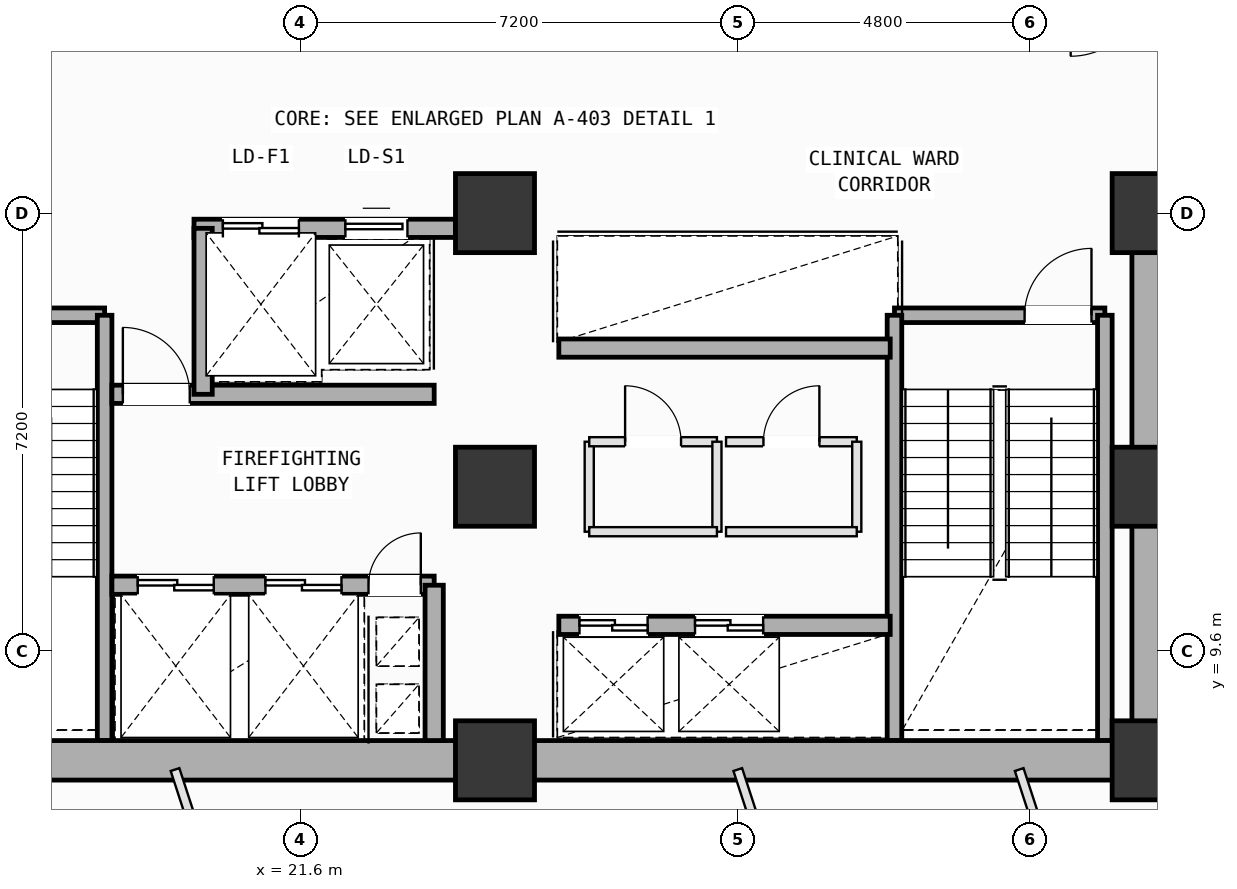
"""IFC4 building model, lengths in metres.
Left out: names, types, materials, properties, quantities, classifications, styles, units other than length and angle.
Written with IfcOpenShell. Run it as: python <this file> out.ifc"""

import sys

from ifc_helpers import new_model, si_unit, direction, frame, frame_2d, origin, origin_2d, place, context, subcontext, project, spatial, rectangle, extrude, element, fill, save


model = new_model("IFC4")
c1 = context("Model", 3, precision=1e-05, world=origin(), true_north=direction((0.0, 1.0)))
c2 = subcontext(c1, "Body", "Model", "MODEL_VIEW")
j1 = project(units=[si_unit("LENGTHUNIT", "METRE"), si_unit("PLANEANGLEUNIT", "RADIAN")], contexts=[c1])
p1 = place(None, origin())
s1 = spatial("IfcSite", under=j1, at=p1, CompositionType="ELEMENT")
p2 = place(p1, origin())
s2 = spatial("IfcBuilding", under=s1, at=p2, CompositionType="ELEMENT")
p3 = place(p2, frame((0.0, 0.0, 100.4)))
s3 = spatial("IfcBuildingStorey", under=s2, at=p3, CompositionType="ELEMENT", Elevation=100.4)
for number, where, z_axis, x_axis in (
    (1, (24.8, 7.8, 0.0), (0.0, 0.0, 1.0), (1.0, 0.0, 0.0)),
    (2, (24.8, 12.3, 0.0), (0.0, 0.0, 1.0), (1.0, 0.0, 0.0)),
    (3, (24.8, 16.8, 0.0), (0.0, 0.0, 1.0), (1.0, 0.0, 0.0)),
    (4, (35.6, 7.8, 0.0), (0.0, 0.0, 1.0), (1.0, 0.0, 0.0)),
    (5, (35.6, 12.3, 0.0), (0.0, 0.0, 1.0), (1.0, 0.0, 0.0)),
    (6, (35.6, 16.8, 0.0), (0.0, 0.0, 1.0), (1.0, 0.0, 0.0)),
):
    element("IfcColumn", number, at=place(p3, frame(where, z_axis=z_axis, x_axis=x_axis)), inside=s3, PredefinedType="COLUMN", context=c2, shape_type="SweptSolid", body=[
        extrude(rectangle(XDim=1.3, YDim=1.3, at=origin_2d()), origin(), (0.0, 0.0, 1.0), 4.0),
    ])
p4 = place(p3, frame((14.92, 15.12, 0.0), z_axis=(0.0, 0.0, 1.0), x_axis=(1.0, 0.0, 0.0)))
e7 = element("IfcWall", 7, at=p4, inside=s3, PredefinedType="SOLIDWALL", context=c2, shape_type="SweptSolid", body=[
    extrude(rectangle(XDim=3.46, YDim=0.24, at=frame_2d((1.73, 0.0))), origin(), (0.0, 0.0, 1.0), 3.78),
])
p5 = place(p4, frame((0.22, 0.0, 0.0)))
e8 = element("IfcOpeningElement", 8, at=p5, cuts=e7, PredefinedType="OPENING", context=c2, shape_type="SweptSolid", body=[
    extrude(rectangle(XDim=1.1, YDim=2.15, at=frame_2d((0.55, 1.075))), frame((0.0, 0.13, 0.0), z_axis=(0.0, -1.0, 0.0), x_axis=(1.0, 0.0, 0.0)), (0.0, 0.0, 1.0), 0.26),
])
p6 = place(p3, frame((18.38, 15.12, 0.0), z_axis=(0.0, 0.0, 1.0), x_axis=(0.0, -1.0, 0.0)))
e9 = element("IfcWall", 9, at=p6, inside=s3, PredefinedType="SOLIDWALL", context=c2, shape_type="SweptSolid", body=[
    extrude(rectangle(XDim=6.995, YDim=0.24, at=frame_2d((3.498, 0.0))), origin(), (0.0, 0.0, 1.0), 3.78),
])
p7 = place(p3, frame((31.37, 15.12, 0.0), z_axis=(0.0, 0.0, 1.0), x_axis=(1.0, 0.0, 0.0)))
e10 = element("IfcWall", 10, at=p7, inside=s3, PredefinedType="SOLIDWALL", context=c2, shape_type="SweptSolid", body=[
    extrude(rectangle(XDim=3.46, YDim=0.24, at=frame_2d((1.73, 0.0))), origin(), (0.0, 0.0, 1.0), 3.78),
])
p8 = place(p7, frame((2.14, 0.0, 0.0)))
e11 = element("IfcOpeningElement", 11, at=p8, cuts=e10, PredefinedType="OPENING", context=c2, shape_type="SweptSolid", body=[
    extrude(rectangle(XDim=1.1, YDim=2.15, at=frame_2d((0.55, 1.075))), frame((0.0, 0.13, 0.0), z_axis=(0.0, -1.0, 0.0), x_axis=(1.0, 0.0, 0.0)), (0.0, 0.0, 1.0), 0.26),
])
for number, where, z_axis, x_axis in (
    (12, (34.83, 15.12, 0.0), (0.0, 0.0, 1.0), (0.0, -1.0, 0.0)),
    (13, (31.37, 8.125, 0.0), (0.0, 0.0, 1.0), (0.0, 1.0, 0.0)),
):
    element("IfcWall", number, at=place(p3, frame(where, z_axis=z_axis, x_axis=x_axis)), inside=s3, PredefinedType="SOLIDWALL", context=c2, shape_type="SweptSolid", body=[
        extrude(rectangle(XDim=6.995, YDim=0.24, at=frame_2d((3.498, 0.0))), origin(), (0.0, 0.0, 1.0), 3.78),
    ])
for number, where, z_axis, x_axis in (
    (14, (14.0, 7.8, 0.0), (0.0, 0.0, 1.0), (1.0, 0.0, 0.0)),
    (15, (24.8, 7.8, 0.0), (0.0, 0.0, 1.0), (1.0, 0.0, 0.0)),
):
    element("IfcWall", number, at=place(p3, frame(where, z_axis=z_axis, x_axis=x_axis)), inside=s3, PredefinedType="SHEAR", context=c2, shape_type="SweptSolid", body=[
        extrude(rectangle(XDim=10.8, YDim=0.65, at=frame_2d((5.4, 0.0))), origin(), (0.0, 0.0, 1.0), 3.78),
    ])
p9 = place(p3, frame((35.6, 7.8, 0.0), z_axis=(0.0, 0.0, 1.0), x_axis=(0.0, 1.0, 0.0)))
e16 = element("IfcWall", 16, at=p9, inside=s3, PredefinedType="SHEAR", context=c2, shape_type="SweptSolid", body=[
    extrude(rectangle(XDim=9.0, YDim=0.65, at=frame_2d((4.5, 0.0))), origin(), (0.0, 0.0, 1.0), 3.78),
])
p10 = place(p3, frame((19.85, 16.55, 0.0), z_axis=(0.0, 0.0, 1.0), x_axis=(1.0, 0.0, 0.0)))
e17 = element("IfcWall", 17, at=p10, inside=s3, PredefinedType="SOLIDWALL", context=c2, shape_type="SweptSolid", body=[
    extrude(rectangle(XDim=4.3, YDim=0.3, at=frame_2d((2.15, 0.0))), origin(), (0.0, 0.0, 1.0), 3.78),
])
p11 = place(p10, frame((0.475, 0.0, 0.0)))
e18 = element("IfcOpeningElement", 18, at=p11, cuts=e17, PredefinedType="OPENING", context=c2, shape_type="SweptSolid", body=[
    extrude(rectangle(XDim=1.25, YDim=2.18, at=frame_2d((0.625, 1.09))), frame((0.0, 0.16, 0.0), z_axis=(0.0, -1.0, 0.0), x_axis=(1.0, 0.0, 0.0)), (0.0, 0.0, 1.0), 0.32),
])
p12 = place(p10, frame((2.49, 0.0, 0.0)))
e19 = element("IfcOpeningElement", 19, at=p12, cuts=e17, PredefinedType="OPENING", context=c2, shape_type="SweptSolid", body=[
    extrude(rectangle(XDim=1.02, YDim=2.12, at=frame_2d((0.51, 1.06))), frame((0.0, 0.16, 0.0), z_axis=(0.0, -1.0, 0.0), x_axis=(1.0, 0.0, 0.0)), (0.0, 0.0, 1.0), 0.32),
])
p13 = place(p3, frame((18.5, 10.68, 0.0), z_axis=(0.0, 0.0, 1.0), x_axis=(1.0, 0.0, 0.0)))
e20 = element("IfcWall", 20, at=p13, inside=s3, PredefinedType="SOLIDWALL", context=c2, shape_type="SweptSolid", body=[
    extrude(rectangle(XDim=5.3, YDim=0.3, at=frame_2d((2.65, 0.0))), origin(), (0.0, 0.0, 1.0), 3.78),
])
p14 = place(p13, frame((4.22, 0.0, 0.0)))
e21 = element("IfcOpeningElement", 21, at=p14, cuts=e20, PredefinedType="OPENING", context=c2, shape_type="SweptSolid", body=[
    extrude(rectangle(XDim=0.86, YDim=2.06, at=frame_2d((0.43, 1.03))), frame((0.0, 0.16, 0.0), z_axis=(0.0, -1.0, 0.0), x_axis=(1.0, 0.0, 0.0)), (0.0, 0.0, 1.0), 0.32),
])
p15 = place(p13, frame((0.425, 0.0, 0.0)))
e22 = element("IfcOpeningElement", 22, at=p15, cuts=e20, PredefinedType="OPENING", context=c2, shape_type="SweptSolid", body=[
    extrude(rectangle(XDim=1.25, YDim=2.18, at=frame_2d((0.625, 1.09))), frame((0.0, 0.16, 0.0), z_axis=(0.0, -1.0, 0.0), x_axis=(1.0, 0.0, 0.0)), (0.0, 0.0, 1.0), 0.32),
])
p16 = place(p13, frame((2.525, 0.0, 0.0)))
e23 = element("IfcOpeningElement", 23, at=p16, cuts=e20, PredefinedType="OPENING", context=c2, shape_type="SweptSolid", body=[
    extrude(rectangle(XDim=1.25, YDim=2.18, at=frame_2d((0.625, 1.09))), frame((0.0, 0.16, 0.0), z_axis=(0.0, -1.0, 0.0), x_axis=(1.0, 0.0, 0.0)), (0.0, 0.0, 1.0), 0.32),
])
p17 = place(p3, frame((18.5, 13.82, 0.0), z_axis=(0.0, 0.0, 1.0), x_axis=(1.0, 0.0, 0.0)))
e24 = element("IfcWall", 24, at=p17, inside=s3, PredefinedType="SOLIDWALL", context=c2, shape_type="SweptSolid", body=[
    extrude(rectangle(XDim=5.3, YDim=0.3, at=frame_2d((2.65, 0.0))), origin(), (0.0, 0.0, 1.0), 3.78),
])
p18 = place(p17, frame((0.18, 0.0, 0.0)))
e25 = element("IfcOpeningElement", 25, at=p18, cuts=e24, PredefinedType="OPENING", context=c2, shape_type="SweptSolid", body=[
    extrude(rectangle(XDim=1.1, YDim=2.15, at=frame_2d((0.55, 1.075))), frame((0.0, 0.16, 0.0), z_axis=(0.0, -1.0, 0.0), x_axis=(1.0, 0.0, 0.0)), (0.0, 0.0, 1.0), 0.32),
])
p19 = place(p3, frame((23.8, 8.125, 0.0), z_axis=(0.0, 0.0, 1.0), x_axis=(0.0, 1.0, 0.0)))
e26 = element("IfcWall", 26, at=p19, inside=s3, PredefinedType="SOLIDWALL", context=c2, shape_type="SweptSolid", body=[
    extrude(rectangle(XDim=2.555, YDim=0.3, at=frame_2d((1.277, 0.0))), origin(), (0.0, 0.0, 1.0), 3.78),
])
p20 = place(p3, frame((20.0, 13.82, 0.0), z_axis=(0.0, 0.0, 1.0), x_axis=(0.0, 1.0, 0.0)))
e27 = element("IfcWall", 27, at=p20, inside=s3, PredefinedType="SOLIDWALL", context=c2, shape_type="SweptSolid", body=[
    extrude(rectangle(XDim=2.73, YDim=0.3, at=frame_2d((1.365, 0.0))), origin(), (0.0, 0.0, 1.0), 3.78),
])
p21 = place(p3, frame((25.85, 10.02, 0.0), z_axis=(0.0, 0.0, 1.0), x_axis=(1.0, 0.0, 0.0)))
e28 = element("IfcWall", 28, at=p21, inside=s3, PredefinedType="SOLIDWALL", context=c2, shape_type="SweptSolid", body=[
    extrude(rectangle(XDim=5.45, YDim=0.3, at=frame_2d((2.725, 0.0))), origin(), (0.0, 0.0, 1.0), 3.78),
])
p22 = place(p21, frame((0.34, 0.0, 0.0)))
e29 = element("IfcOpeningElement", 29, at=p22, cuts=e28, PredefinedType="OPENING", context=c2, shape_type="SweptSolid", body=[
    extrude(rectangle(XDim=1.12, YDim=2.15, at=frame_2d((0.56, 1.075))), frame((0.0, 0.16, 0.0), z_axis=(0.0, -1.0, 0.0), x_axis=(1.0, 0.0, 0.0)), (0.0, 0.0, 1.0), 0.32),
])
p23 = place(p21, frame((2.24, 0.0, 0.0)))
e30 = element("IfcOpeningElement", 30, at=p23, cuts=e28, PredefinedType="OPENING", context=c2, shape_type="SweptSolid", body=[
    extrude(rectangle(XDim=1.12, YDim=2.15, at=frame_2d((0.56, 1.075))), frame((0.0, 0.16, 0.0), z_axis=(0.0, -1.0, 0.0), x_axis=(1.0, 0.0, 0.0)), (0.0, 0.0, 1.0), 0.32),
])
p24 = place(p3, frame((25.85, 14.58, 0.0), z_axis=(0.0, 0.0, 1.0), x_axis=(1.0, 0.0, 0.0)))
e31 = element("IfcWall", 31, at=p24, inside=s3, PredefinedType="SOLIDWALL", context=c2, shape_type="SweptSolid", body=[
    extrude(rectangle(XDim=5.45, YDim=0.3, at=frame_2d((2.725, 0.0))), origin(), (0.0, 0.0, 1.0), 3.78),
])
p25 = place(p3, frame((26.35, 11.56, 0.0), z_axis=(0.0, 0.0, 1.0), x_axis=(0.0, 1.0, 0.0)))
e32 = element("IfcWall", 32, at=p25, inside=s3, PredefinedType="PARTITIONING", context=c2, shape_type="SweptSolid", body=[
    extrude(rectangle(XDim=1.48, YDim=0.15, at=frame_2d((0.74, 0.0))), origin(), (0.0, 0.0, 1.0), 3.78),
])
p26 = place(p3, frame((26.35, 13.04, 0.0), z_axis=(0.0, 0.0, 1.0), x_axis=(1.0, 0.0, 0.0)))
e33 = element("IfcWall", 33, at=p26, inside=s3, PredefinedType="PARTITIONING", context=c2, shape_type="SweptSolid", body=[
    extrude(rectangle(XDim=2.1, YDim=0.15, at=frame_2d((1.05, 0.0))), origin(), (0.0, 0.0, 1.0), 3.78),
])
p27 = place(p26, frame((0.59, 0.0, 0.0)))
e34 = element("IfcOpeningElement", 34, at=p27, cuts=e33, PredefinedType="OPENING", context=c2, shape_type="SweptSolid", body=[
    extrude(rectangle(XDim=0.92, YDim=2.1, at=frame_2d((0.46, 1.05))), frame((0.0, 0.085, 0.0), z_axis=(0.0, -1.0, 0.0), x_axis=(1.0, 0.0, 0.0)), (0.0, 0.0, 1.0), 0.17),
])
p28 = place(p3, frame((28.45, 13.04, 0.0), z_axis=(0.0, 0.0, 1.0), x_axis=(0.0, -1.0, 0.0)))
e35 = element("IfcWall", 35, at=p28, inside=s3, PredefinedType="PARTITIONING", context=c2, shape_type="SweptSolid", body=[
    extrude(rectangle(XDim=1.48, YDim=0.15, at=frame_2d((0.74, 0.0))), origin(), (0.0, 0.0, 1.0), 3.78),
])
p29 = place(p3, frame((28.45, 11.56, 0.0), z_axis=(0.0, 0.0, 1.0), x_axis=(-1.0, 0.0, 0.0)))
e36 = element("IfcWall", 36, at=p29, inside=s3, PredefinedType="PARTITIONING", context=c2, shape_type="SweptSolid", body=[
    extrude(rectangle(XDim=2.1, YDim=0.15, at=frame_2d((1.05, 0.0))), origin(), (0.0, 0.0, 1.0), 3.78),
])
p30 = place(p3, frame((28.6, 13.04, 0.0), z_axis=(0.0, 0.0, 1.0), x_axis=(1.0, 0.0, 0.0)))
e37 = element("IfcWall", 37, at=p30, inside=s3, PredefinedType="PARTITIONING", context=c2, shape_type="SweptSolid", body=[
    extrude(rectangle(XDim=2.15, YDim=0.15, at=frame_2d((1.075, 0.0))), origin(), (0.0, 0.0, 1.0), 3.78),
])
p31 = place(p30, frame((0.615, 0.0, 0.0)))
e38 = element("IfcOpeningElement", 38, at=p31, cuts=e37, PredefinedType="OPENING", context=c2, shape_type="SweptSolid", body=[
    extrude(rectangle(XDim=0.92, YDim=2.1, at=frame_2d((0.46, 1.05))), frame((0.0, 0.085, 0.0), z_axis=(0.0, -1.0, 0.0), x_axis=(1.0, 0.0, 0.0)), (0.0, 0.0, 1.0), 0.17),
])
p32 = place(p3, frame((30.75, 13.04, 0.0), z_axis=(0.0, 0.0, 1.0), x_axis=(0.0, -1.0, 0.0)))
e39 = element("IfcWall", 39, at=p32, inside=s3, PredefinedType="PARTITIONING", context=c2, shape_type="SweptSolid", body=[
    extrude(rectangle(XDim=1.48, YDim=0.15, at=frame_2d((0.74, 0.0))), origin(), (0.0, 0.0, 1.0), 3.78),
])
p33 = place(p3, frame((30.75, 11.56, 0.0), z_axis=(0.0, 0.0, 1.0), x_axis=(-1.0, 0.0, 0.0)))
e40 = element("IfcWall", 40, at=p33, inside=s3, PredefinedType="PARTITIONING", context=c2, shape_type="SweptSolid", body=[
    extrude(rectangle(XDim=2.15, YDim=0.15, at=frame_2d((1.075, 0.0))), origin(), (0.0, 0.0, 1.0), 3.78),
])
p34 = place(p3, frame((19.538, 7.648, 0.0), z_axis=(0.0, 0.0, 1.0), x_axis=(0.309807256066, -0.95079938162, 0.0)))
e41 = element("IfcWall", 41, at=p34, inside=s3, PredefinedType="PARTITIONING", context=c2, shape_type="SweptSolid", body=[
    extrude(rectangle(XDim=10.164, YDim=0.15, at=frame_2d((5.082, 0.0))), origin(), (0.0, 0.0, 1.0), 3.78),
])
p35 = place(p3, frame((28.793, 7.648, 0.0), z_axis=(0.0, 0.0, 1.0), x_axis=(0.309844655653, -0.950787194573, 0.0)))
e42 = element("IfcWall", 42, at=p35, inside=s3, PredefinedType="PARTITIONING", context=c2, shape_type="SweptSolid", body=[
    extrude(rectangle(XDim=7.662, YDim=0.15, at=frame_2d((3.831, 0.0))), origin(), (0.0, 0.0, 1.0), 3.78),
])
p36 = place(p35, frame((3.559, 0.0, 0.0)))
e43 = element("IfcOpeningElement", 43, at=p36, cuts=e42, PredefinedType="OPENING", context=c2, shape_type="SweptSolid", body=[
    extrude(rectangle(XDim=0.86, YDim=2.06, at=frame_2d((0.43, 1.03))), frame((0.0, 0.085, 0.0), z_axis=(0.0, -1.0, 0.0), x_axis=(1.0, 0.0, 0.0)), (0.0, 0.0, 1.0), 0.17),
])
p37 = place(p3, frame((33.421, 7.648, 0.0), z_axis=(0.0, 0.0, 1.0), x_axis=(0.309798827462, -0.950802127944, 0.0)))
e44 = element("IfcWall", 44, at=p37, inside=s3, PredefinedType="PARTITIONING", context=c2, shape_type="SweptSolid", body=[
    extrude(rectangle(XDim=5.862, YDim=0.15, at=frame_2d((2.931, 0.0))), origin(), (0.0, 0.0, 1.0), 3.78),
])
p38 = place(p37, frame((2.659, 0.0, 0.0)))
e45 = element("IfcOpeningElement", 45, at=p38, cuts=e44, PredefinedType="OPENING", context=c2, shape_type="SweptSolid", body=[
    extrude(rectangle(XDim=0.86, YDim=2.06, at=frame_2d((0.43, 1.03))), frame((0.0, 0.085, 0.0), z_axis=(0.0, -1.0, 0.0), x_axis=(1.0, 0.0, 0.0)), (0.0, 0.0, 1.0), 0.17),
])
p39 = place(p3, frame((35.6, 7.5, 0.0), z_axis=(0.0, 0.0, 1.0), x_axis=(1.0, 0.0, 0.0)))
e46 = element("IfcWall", 46, at=p39, inside=s3, PredefinedType="PARTITIONING", context=c2, shape_type="SweptSolid", body=[
    extrude(rectangle(XDim=0.55, YDim=0.15, at=frame_2d((0.275, 0.0))), origin(), (0.0, 0.0, 1.0), 2.965),
])
p40 = place(p8, origin())
e47 = element("IfcDoor", 47, at=p40, inside=s3, OperationType="SINGLE_SWING_RIGHT", PredefinedType="DOOR", context=c2, shape_type="SweptSolid", body=[
    extrude(rectangle(XDim=1.1, YDim=2.15, at=frame_2d((0.55, 1.075))), frame((0.0, 0.025, 0.0), z_axis=(0.0, -1.0, 0.0), x_axis=(1.0, 0.0, 0.0)), (0.0, 0.0, 1.0), 0.05),
])
fill(e11, e47)
p41 = place(p14, origin())
e48 = element("IfcDoor", 48, at=p41, inside=s3, OperationType="SINGLE_SWING_RIGHT", PredefinedType="DOOR", context=c2, shape_type="SweptSolid", body=[
    extrude(rectangle(XDim=0.86, YDim=2.06, at=frame_2d((0.43, 1.03))), frame((0.0, 0.025, 0.0), z_axis=(0.0, -1.0, 0.0), x_axis=(1.0, 0.0, 0.0)), (0.0, 0.0, 1.0), 0.05),
])
fill(e21, e48)
p42 = place(p18, origin())
e49 = element("IfcDoor", 49, at=p42, inside=s3, OperationType="SINGLE_SWING_LEFT", PredefinedType="DOOR", context=c2, shape_type="SweptSolid", body=[
    extrude(rectangle(XDim=1.1, YDim=2.15, at=frame_2d((0.55, 1.075))), frame((0.0, 0.025, 0.0), z_axis=(0.0, -1.0, 0.0), x_axis=(1.0, 0.0, 0.0)), (0.0, 0.0, 1.0), 0.05),
])
fill(e25, e49)
p43 = place(p15, origin())
e50 = element("IfcDoor", 50, at=p43, inside=s3, OperationType="DOUBLE_DOOR_SLIDING", PredefinedType="DOOR", context=c2, shape_type="SweptSolid", body=[
    extrude(rectangle(XDim=1.25, YDim=2.18, at=frame_2d((0.625, 1.09))), frame((0.0, 0.025, 0.0), z_axis=(0.0, -1.0, 0.0), x_axis=(1.0, 0.0, 0.0)), (0.0, 0.0, 1.0), 0.05),
])
fill(e22, e50)
p44 = place(p16, origin())
e51 = element("IfcDoor", 51, at=p44, inside=s3, OperationType="DOUBLE_DOOR_SLIDING", PredefinedType="DOOR", context=c2, shape_type="SweptSolid", body=[
    extrude(rectangle(XDim=1.25, YDim=2.18, at=frame_2d((0.625, 1.09))), frame((0.0, 0.025, 0.0), z_axis=(0.0, -1.0, 0.0), x_axis=(1.0, 0.0, 0.0)), (0.0, 0.0, 1.0), 0.05),
])
fill(e23, e51)
p45 = place(p22, origin())
e52 = element("IfcDoor", 52, at=p45, inside=s3, OperationType="DOUBLE_DOOR_SLIDING", PredefinedType="DOOR", context=c2, shape_type="SweptSolid", body=[
    extrude(rectangle(XDim=1.12, YDim=2.15, at=frame_2d((0.56, 1.075))), frame((0.0, 0.025, 0.0), z_axis=(0.0, -1.0, 0.0), x_axis=(1.0, 0.0, 0.0)), (0.0, 0.0, 1.0), 0.05),
])
fill(e29, e52)
p46 = place(p23, origin())
e53 = element("IfcDoor", 53, at=p46, inside=s3, OperationType="DOUBLE_DOOR_SLIDING", PredefinedType="DOOR", context=c2, shape_type="SweptSolid", body=[
    extrude(rectangle(XDim=1.12, YDim=2.15, at=frame_2d((0.56, 1.075))), frame((0.0, 0.025, 0.0), z_axis=(0.0, -1.0, 0.0), x_axis=(1.0, 0.0, 0.0)), (0.0, 0.0, 1.0), 0.05),
])
fill(e30, e53)
p47 = place(p11, origin())
e54 = element("IfcDoor", 54, at=p47, inside=s3, OperationType="DOUBLE_DOOR_SLIDING", PredefinedType="DOOR", context=c2, shape_type="SweptSolid", body=[
    extrude(rectangle(XDim=1.25, YDim=2.18, at=frame_2d((0.625, 1.09))), frame((0.0, 0.025, 0.0), z_axis=(0.0, -1.0, 0.0), x_axis=(1.0, 0.0, 0.0)), (0.0, 0.0, 1.0), 0.05),
])
fill(e18, e54)
p48 = place(p12, origin())
e55 = element("IfcDoor", 55, at=p48, inside=s3, OperationType="SLIDING_TO_LEFT", PredefinedType="DOOR", context=c2, shape_type="SweptSolid", body=[
    extrude(rectangle(XDim=1.02, YDim=2.12, at=frame_2d((0.51, 1.06))), frame((0.0, 0.025, 0.0), z_axis=(0.0, -1.0, 0.0), x_axis=(1.0, 0.0, 0.0)), (0.0, 0.0, 1.0), 0.05),
])
fill(e19, e55)
p49 = place(p27, origin())
e56 = element("IfcDoor", 56, at=p49, inside=s3, OperationType="SINGLE_SWING_LEFT", PredefinedType="DOOR", context=c2, shape_type="SweptSolid", body=[
    extrude(rectangle(XDim=0.92, YDim=2.1, at=frame_2d((0.46, 1.05))), frame((0.0, 0.025, 0.0), z_axis=(0.0, -1.0, 0.0), x_axis=(1.0, 0.0, 0.0)), (0.0, 0.0, 1.0), 0.05),
])
fill(e34, e56)
p50 = place(p31, origin())
e57 = element("IfcDoor", 57, at=p50, inside=s3, OperationType="SINGLE_SWING_RIGHT", PredefinedType="DOOR", context=c2, shape_type="SweptSolid", body=[
    extrude(rectangle(XDim=0.92, YDim=2.1, at=frame_2d((0.46, 1.05))), frame((0.0, 0.025, 0.0), z_axis=(0.0, -1.0, 0.0), x_axis=(1.0, 0.0, 0.0)), (0.0, 0.0, 1.0), 0.05),
])
fill(e38, e57)
save(model, sys.argv[1])
